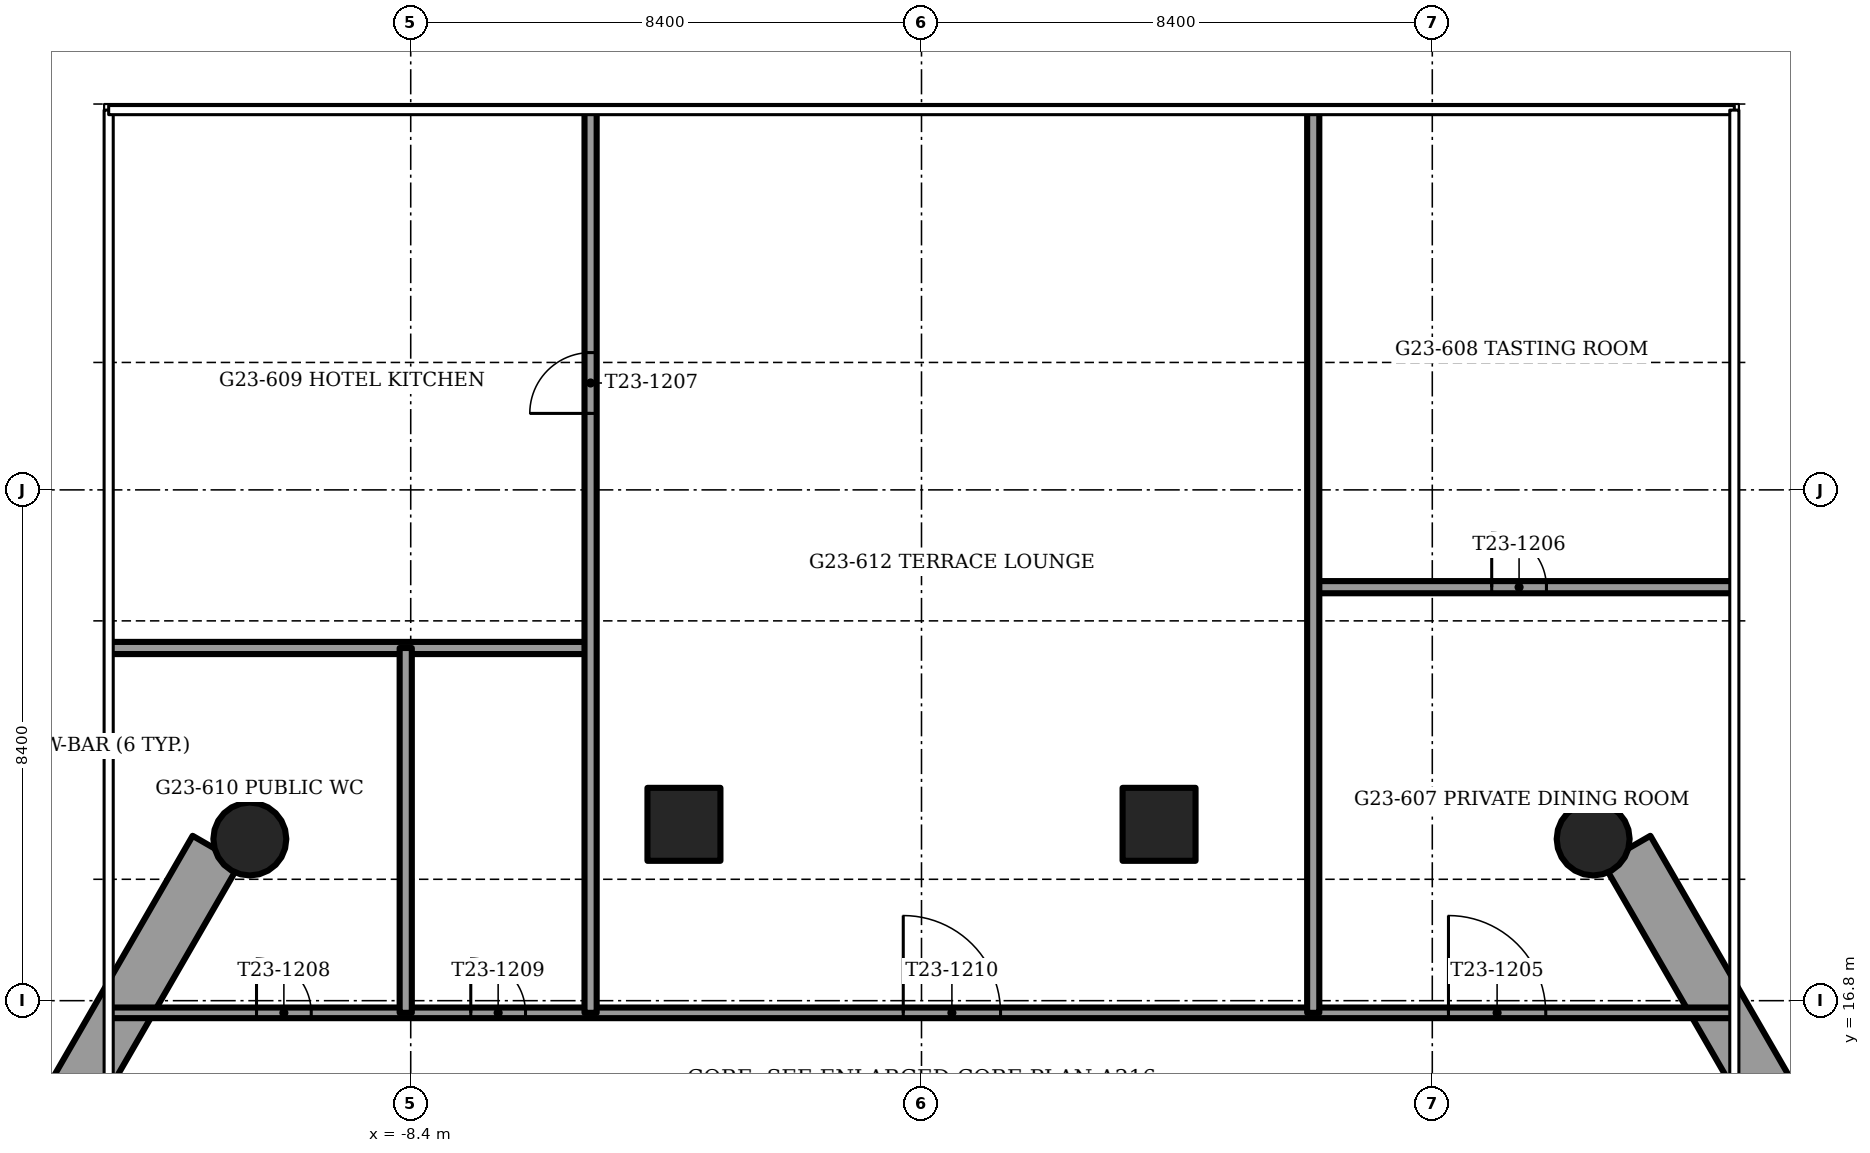
"""IFC4 building model, lengths in metres.
Left out: names, types, materials, properties, quantities, classifications, styles, units other than length and angle.
Written with IfcOpenShell. Run it as: python <this file> out.ifc"""

import sys

from ifc_helpers import new_model, si_unit, direction, frame, frame_2d, origin, origin_2d, place, context, subcontext, project, spatial, rectangle, circle, extrude, element, fill, save


model = new_model("IFC4")
c1 = context("Model", 3, precision=1e-05, world=origin(), true_north=direction((0.0, 1.0)))
c2 = subcontext(c1, "Body", "Model", "MODEL_VIEW")
j1 = project(units=[si_unit("LENGTHUNIT", "METRE"), si_unit("PLANEANGLEUNIT", "RADIAN")], contexts=[c1])
p1 = place(None, origin())
s1 = spatial("IfcSite", under=j1, at=p1, CompositionType="ELEMENT")
p2 = place(p1, origin())
s2 = spatial("IfcBuilding", under=s1, at=p2, CompositionType="ELEMENT")
p3 = place(p2, frame((0.0, 0.0, 93.0)))
s3 = spatial("IfcBuildingStorey", under=s2, at=p3, CompositionType="ELEMENT", Elevation=93.0)
for number, where, z_axis, x_axis in (
    (1, (-11.046, 19.459, -1.2), (0.0, 0.0, 1.0), (1.0, 0.0, 0.0)),
    (2, (11.046, 19.459, -1.2), (0.0, 0.0, 1.0), (1.0, 0.0, 0.0)),
):
    element("IfcColumn", number, at=place(p3, frame(where, z_axis=z_axis, x_axis=x_axis)), inside=s3, PredefinedType="COLUMN", context=c2, shape_type="SweptSolid", body=[
        extrude(circle(Radius=0.6, at=origin_2d()), origin(), (0.0, 0.0, 1.0), 3.75),
    ])
for number, where, z_axis, x_axis in (
    (3, (3.907, 19.7, -1.2), (0.0, 0.0, 1.0), (1.0, 0.0, 0.0)),
    (4, (-3.907, 19.7, -1.2), (0.0, 0.0, 1.0), (1.0, 0.0, 0.0)),
):
    element("IfcColumn", number, at=place(p3, frame(where, z_axis=z_axis, x_axis=x_axis)), inside=s3, PredefinedType="COLUMN", context=c2, shape_type="SweptSolid", body=[
        extrude(rectangle(XDim=1.2, YDim=1.2, at=origin_2d()), origin(), (0.0, 0.0, 1.0), 3.75),
    ])
for number, where, z_axis, x_axis in (
    (5, (-11.597, 19.286, 0.0), (0.0, 0.0, 1.0), (-0.5, -0.866, 0.0)),
    (6, (14.811, 13.72, 0.0), (0.0, 0.0, 1.0), (-0.5, 0.866, 0.0)),
):
    element("IfcWall", number, at=place(p3, frame(where, z_axis=z_axis, x_axis=x_axis)), inside=s3, PredefinedType="PARAPET", context=c2, shape_type="SweptSolid", body=[
        extrude(rectangle(XDim=6.427, YDim=0.9, at=frame_2d((3.214, 0.0))), origin(), (0.0, 0.0, 1.0), 1.1),
    ])
p4 = place(p3, frame((-13.348, 16.6, 0.0), z_axis=(0.0, 0.0, 1.0), x_axis=(1.0, 0.0, 0.0)))
e7 = element("IfcWall", 7, at=p4, inside=s3, PredefinedType="PARTITIONING", context=c2, shape_type="SweptSolid", body=[
    extrude(rectangle(XDim=26.696, YDim=0.175, at=frame_2d((13.348, 0.0))), origin(), (0.0, 0.0, 1.0), 2.55),
])
p5 = place(p4, frame((22.014, 0.0, 0.0)))
e8 = element("IfcOpeningElement", 8, at=p5, cuts=e7, PredefinedType="OPENING", context=c2, shape_type="SweptSolid", body=[
    extrude(rectangle(XDim=1.6, YDim=2.1, at=frame_2d((0.8, 1.05))), frame((0.0, 0.087, 0.0), z_axis=(0.0, -1.0, 0.0), x_axis=(1.0, 0.0, 0.0)), (0.0, 0.0, 1.0), 0.175),
])
p6 = place(p4, frame((2.412, 0.0, 0.0)))
e9 = element("IfcOpeningElement", 9, at=p6, cuts=e7, PredefinedType="OPENING", context=c2, shape_type="SweptSolid", body=[
    extrude(rectangle(XDim=0.9, YDim=2.1, at=frame_2d((0.45, 1.05))), frame((0.0, 0.087, 0.0), z_axis=(0.0, -1.0, 0.0), x_axis=(1.0, 0.0, 0.0)), (0.0, 0.0, 1.0), 0.175),
])
p7 = place(p4, frame((5.936, 0.0, 0.0)))
e10 = element("IfcOpeningElement", 10, at=p7, cuts=e7, PredefinedType="OPENING", context=c2, shape_type="SweptSolid", body=[
    extrude(rectangle(XDim=0.9, YDim=2.1, at=frame_2d((0.45, 1.05))), frame((0.0, 0.087, 0.0), z_axis=(0.0, -1.0, 0.0), x_axis=(1.0, 0.0, 0.0)), (0.0, 0.0, 1.0), 0.175),
])
p8 = place(p4, frame((13.048, 0.0, 0.0)))
e11 = element("IfcOpeningElement", 11, at=p8, cuts=e7, PredefinedType="OPENING", context=c2, shape_type="SweptSolid", body=[
    extrude(rectangle(XDim=1.6, YDim=2.1, at=frame_2d((0.8, 1.05))), frame((0.0, 0.087, 0.0), z_axis=(0.0, -1.0, 0.0), x_axis=(1.0, 0.0, 0.0)), (0.0, 0.0, 1.0), 0.175),
])
p9 = place(p3, frame((-13.348, 22.6, 0.0), z_axis=(0.0, 0.0, 1.0), x_axis=(1.0, 0.0, 0.0)))
e12 = element("IfcWall", 12, at=p9, inside=s3, PredefinedType="PARTITIONING", context=c2, shape_type="SweptSolid", body=[
    extrude(rectangle(XDim=7.906, YDim=0.2, at=frame_2d((3.953, 0.0))), origin(), (0.0, 0.0, 1.0), 3.45),
])
p10 = place(p3, frame((6.442, 23.6, 0.0), z_axis=(0.0, 0.0, 1.0), x_axis=(1.0, 0.0, 0.0)))
e13 = element("IfcWall", 13, at=p10, inside=s3, PredefinedType="PARTITIONING", context=c2, shape_type="SweptSolid", body=[
    extrude(rectangle(XDim=6.906, YDim=0.2, at=frame_2d((3.453, 0.0))), origin(), (0.0, 0.0, 1.0), 3.45),
])
p11 = place(p10, frame((2.935, 0.0, 0.0)))
e14 = element("IfcOpeningElement", 14, at=p11, cuts=e13, PredefinedType="OPENING", context=c2, shape_type="SweptSolid", body=[
    extrude(rectangle(XDim=0.9, YDim=2.1, at=frame_2d((0.45, 1.05))), frame((0.0, 0.1, 0.0), z_axis=(0.0, -1.0, 0.0), x_axis=(1.0, 0.0, 0.0)), (0.0, 0.0, 1.0), 0.2),
])
p12 = place(p3, frame((-8.482, 16.6, 0.0), z_axis=(0.0, 0.0, 1.0), x_axis=(0.0, 1.0, 0.0)))
e15 = element("IfcWall", 15, at=p12, inside=s3, PredefinedType="PARTITIONING", context=c2, shape_type="SweptSolid", body=[
    extrude(rectangle(XDim=6.0, YDim=0.2, at=frame_2d((3.0, 0.0))), origin(), (0.0, 0.0, 1.0), 2.828),
])
p13 = place(p3, frame((-5.442, 16.6, 0.0), z_axis=(0.0, 0.0, 1.0), x_axis=(0.0, 1.0, 0.0)))
e16 = element("IfcWall", 16, at=p13, inside=s3, PredefinedType="PARTITIONING", context=c2, shape_type="SweptSolid", body=[
    extrude(rectangle(XDim=14.826, YDim=0.2, at=frame_2d((7.413, 0.0))), origin(), (0.0, 0.0, 1.0), 2.828),
])
p14 = place(p13, frame((9.858, 0.0, 0.0)))
e17 = element("IfcOpeningElement", 17, at=p14, cuts=e16, PredefinedType="OPENING", context=c2, shape_type="SweptSolid", body=[
    extrude(rectangle(XDim=1.0, YDim=2.1, at=frame_2d((0.5, 1.05))), frame((0.0, 0.1, 0.0), z_axis=(0.0, -1.0, 0.0), x_axis=(1.0, 0.0, 0.0)), (0.0, 0.0, 1.0), 0.2),
])
p15 = place(p3, frame((6.442, 16.6, 0.0), z_axis=(0.0, 0.0, 1.0), x_axis=(0.0, 1.0, 0.0)))
e18 = element("IfcWall", 18, at=p15, inside=s3, PredefinedType="PARTITIONING", context=c2, shape_type="SweptSolid", body=[
    extrude(rectangle(XDim=14.826, YDim=0.2, at=frame_2d((7.413, 0.0))), origin(), (0.0, 0.0, 1.0), 2.828),
])
p16 = place(p5, origin())
e19 = element("IfcDoor", 19, at=p16, inside=s3, OperationType="DOUBLE_DOOR_SINGLE_SWING", PredefinedType="DOOR", context=c2, shape_type="SweptSolid", body=[
    extrude(rectangle(XDim=1.6, YDim=2.1, at=frame_2d((0.8, 1.05))), frame((0.0, 0.025, 0.0), z_axis=(0.0, -1.0, 0.0), x_axis=(1.0, 0.0, 0.0)), (0.0, 0.0, 1.0), 0.05),
])
fill(e8, e19)
p17 = place(p11, origin())
e20 = element("IfcDoor", 20, at=p17, inside=s3, OperationType="SINGLE_SWING_RIGHT", PredefinedType="DOOR", context=c2, shape_type="SweptSolid", body=[
    extrude(rectangle(XDim=0.9, YDim=2.1, at=frame_2d((0.45, 1.05))), frame((0.0, 0.025, 0.0), z_axis=(0.0, -1.0, 0.0), x_axis=(1.0, 0.0, 0.0)), (0.0, 0.0, 1.0), 0.05),
])
fill(e14, e20)
p18 = place(p14, origin())
e21 = element("IfcDoor", 21, at=p18, inside=s3, OperationType="SINGLE_SWING_LEFT", PredefinedType="DOOR", context=c2, shape_type="SweptSolid", body=[
    extrude(rectangle(XDim=1.0, YDim=2.1, at=frame_2d((0.5, 1.05))), frame((0.0, 0.025, 0.0), z_axis=(0.0, -1.0, 0.0), x_axis=(1.0, 0.0, 0.0)), (0.0, 0.0, 1.0), 0.05),
])
fill(e17, e21)
p19 = place(p6, origin())
e22 = element("IfcDoor", 22, at=p19, inside=s3, OperationType="SINGLE_SWING_RIGHT", PredefinedType="DOOR", context=c2, shape_type="SweptSolid", body=[
    extrude(rectangle(XDim=0.9, YDim=2.1, at=frame_2d((0.45, 1.05))), frame((0.0, 0.025, 0.0), z_axis=(0.0, -1.0, 0.0), x_axis=(1.0, 0.0, 0.0)), (0.0, 0.0, 1.0), 0.05),
])
fill(e9, e22)
p20 = place(p7, origin())
e23 = element("IfcDoor", 23, at=p20, inside=s3, OperationType="SINGLE_SWING_LEFT", PredefinedType="DOOR", context=c2, shape_type="SweptSolid", body=[
    extrude(rectangle(XDim=0.9, YDim=2.1, at=frame_2d((0.45, 1.05))), frame((0.0, 0.025, 0.0), z_axis=(0.0, -1.0, 0.0), x_axis=(1.0, 0.0, 0.0)), (0.0, 0.0, 1.0), 0.05),
])
fill(e10, e23)
p21 = place(p8, origin())
e24 = element("IfcDoor", 24, at=p21, inside=s3, OperationType="DOUBLE_DOOR_SINGLE_SWING", PredefinedType="DOOR", context=c2, shape_type="SweptSolid", body=[
    extrude(rectangle(XDim=1.6, YDim=2.1, at=frame_2d((0.8, 1.05))), frame((0.0, 0.025, 0.0), z_axis=(0.0, -1.0, 0.0), x_axis=(1.0, 0.0, 0.0)), (0.0, 0.0, 1.0), 0.05),
])
fill(e11, e24)
save(model, sys.argv[1])
